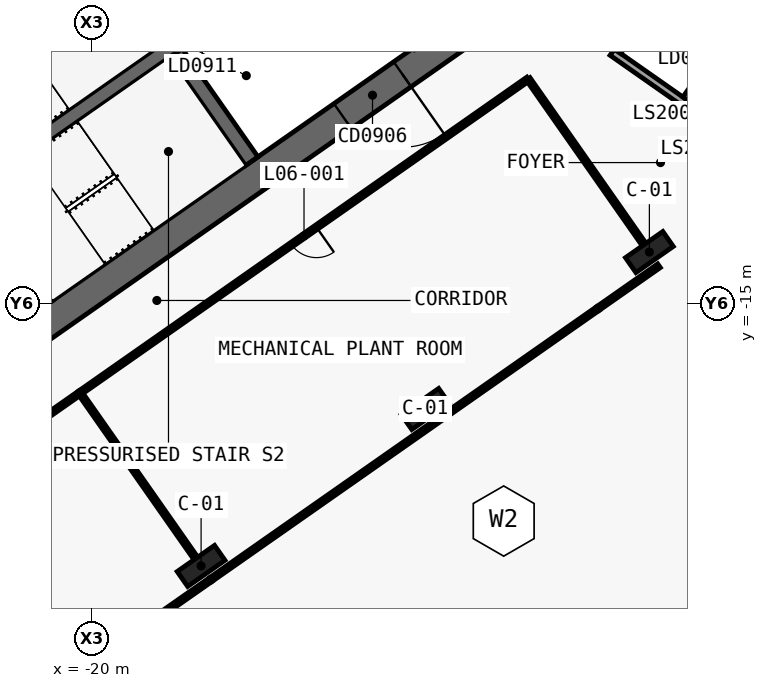
"""IFC4 building model, lengths in metres.
Left out: names, types, materials, properties, quantities, classifications, styles, units other than length and angle.
Written with IfcOpenShell. Run it as: python <this file> out.ifc"""

import sys

from ifc_helpers import new_model, si_unit, direction, frame, frame_2d, origin, origin_2d, place, context, subcontext, project, spatial, polyline, rectangle, outline, extrude, element, fill, save


model = new_model("IFC4")
c1 = context("Model", 3, precision=1e-05, world=origin(), true_north=direction((0.0, 1.0)))
c2 = subcontext(c1, "Body", "Model", "MODEL_VIEW")
j1 = project(units=[si_unit("LENGTHUNIT", "METRE"), si_unit("PLANEANGLEUNIT", "RADIAN")], contexts=[c1])
p1 = place(None, origin())
s1 = spatial("IfcSite", under=j1, at=p1, CompositionType="ELEMENT")
p2 = place(p1, origin())
s2 = spatial("IfcBuilding", under=s1, at=p2, CompositionType="ELEMENT")
p3 = place(p2, frame((0.0, 0.0, 43.0)))
s3 = spatial("IfcBuildingStorey", under=s2, at=p3, CompositionType="ELEMENT", Elevation=43.0)
p4 = place(p3, frame((0.037, 11.867, 0.0), z_axis=(0.0, 0.0, 1.0), x_axis=(-0.819155306259, -0.573571777746, 0.0)))
e1 = element("IfcWall", 1, at=p4, inside=s3, PredefinedType="SHEAR", context=c2, shape_type="SweptSolid", body=[
    extrude(outline(polyline([(33.837, 0.5), (0.7, 0.5), (0.0, -0.5), (33.837, -0.5), (33.837, 0.5)])), origin(), (0.0, 0.0, 1.0), 5.5),
])
p5 = place(p3, frame((0.037, -0.585, 0.0), z_axis=(0.0, 0.0, 1.0), x_axis=(-0.819157152511, -0.573569140985, 0.0)))
e2 = element("IfcWall", 2, at=p5, inside=s3, PredefinedType="SHEAR", context=c2, shape_type="SweptSolid", body=[
    extrude(outline(polyline([(26.695, 0.5), (0.7, 0.5), (0.0, -0.5), (26.695, -0.5), (26.695, 0.5)])), origin(), (0.0, 0.0, 1.0), 5.5),
])
p6 = place(p5, frame((2.995, 0.0, 0.0)))
e3 = element("IfcOpeningElement", 3, at=p6, cuts=e2, PredefinedType="OPENING", context=c2, shape_type="SweptSolid", body=[
    extrude(rectangle(XDim=2.4, YDim=2.1, at=frame_2d((1.2, 1.05))), frame((0.0, 0.51, 0.0), z_axis=(0.0, -1.0, 0.0), x_axis=(1.0, 0.0, 0.0)), (0.0, 0.0, 1.0), 1.02),
])
p7 = place(p5, frame((11.995, 0.0, 0.0)))
e4 = element("IfcOpeningElement", 4, at=p7, cuts=e2, PredefinedType="OPENING", context=c2, shape_type="SweptSolid", body=[
    extrude(rectangle(XDim=2.4, YDim=2.1, at=frame_2d((1.2, 1.05))), frame((0.0, 0.51, 0.0), z_axis=(0.0, -1.0, 0.0), x_axis=(1.0, 0.0, 0.0)), (0.0, 0.0, 1.0), 1.02),
])
p8 = place(p3, frame((-14.745, -10.324, 0.0), z_axis=(0.0, 0.0, 1.0), x_axis=(-0.57356780395, 0.819158088694, 0.0)))
e5 = element("IfcWall", 5, at=p8, inside=s3, PredefinedType="SHEAR", context=c2, shape_type="SweptSolid", body=[
    extrude(outline(polyline([(4.35, 0.25), (0.0, 0.25), (0.0, -0.25), (4.35, -0.25), (4.35, 0.25)])), origin(), (0.0, 0.0, 1.0), 5.5),
])
p9 = place(p3, frame((-2.638, 3.768, 0.0), z_axis=(0.0, 0.0, 1.0), x_axis=(-0.819148977158, -0.573580816643, 0.0)))
e6 = element("IfcWall", 6, at=p9, inside=s3, PredefinedType="SHEAR", context=c2, shape_type="SweptSolid", body=[
    extrude(outline(polyline([(26.0, 0.25), (0.0, 0.25), (0.0, -0.25), (26.0, -0.25), (26.0, 0.25)])), origin(), (0.0, 0.0, 1.0), 5.5),
])
p10 = place(p9, frame((1.169, 0.0, 0.0)))
e7 = element("IfcOpeningElement", 7, at=p10, cuts=e6, PredefinedType="OPENING", context=c2, shape_type="SweptSolid", body=[
    extrude(rectangle(XDim=1.1, YDim=2.1, at=frame_2d((0.55, 1.05))), frame((0.0, 0.26, 0.0), z_axis=(0.0, -1.0, 0.0), x_axis=(1.0, 0.0, 0.0)), (0.0, 0.0, 1.0), 0.52),
])
p11 = place(p9, frame((3.206, 0.0, 0.0)))
e8 = element("IfcOpeningElement", 8, at=p11, cuts=e6, PredefinedType="OPENING", context=c2, shape_type="SweptSolid", body=[
    extrude(rectangle(XDim=1.1, YDim=2.1, at=frame_2d((0.55, 1.05))), frame((0.0, 0.26, 0.0), z_axis=(0.0, -1.0, 0.0), x_axis=(1.0, 0.0, 0.0)), (0.0, 0.0, 1.0), 0.52),
])
p12 = place(p9, frame((5.244, 0.0, 0.0)))
e9 = element("IfcOpeningElement", 9, at=p12, cuts=e6, PredefinedType="OPENING", context=c2, shape_type="SweptSolid", body=[
    extrude(rectangle(XDim=1.1, YDim=2.1, at=frame_2d((0.55, 1.05))), frame((0.0, 0.26, 0.0), z_axis=(0.0, -1.0, 0.0), x_axis=(1.0, 0.0, 0.0)), (0.0, 0.0, 1.0), 0.52),
])
p13 = place(p9, frame((7.281, 0.0, 0.0)))
e10 = element("IfcOpeningElement", 10, at=p13, cuts=e6, PredefinedType="OPENING", context=c2, shape_type="SweptSolid", body=[
    extrude(rectangle(XDim=1.1, YDim=2.1, at=frame_2d((0.55, 1.05))), frame((0.0, 0.26, 0.0), z_axis=(0.0, -1.0, 0.0), x_axis=(1.0, 0.0, 0.0)), (0.0, 0.0, 1.0), 0.52),
])
p14 = place(p9, frame((9.688, 0.0, 0.0)))
e11 = element("IfcOpeningElement", 11, at=p14, cuts=e6, PredefinedType="OPENING", context=c2, shape_type="SweptSolid", body=[
    extrude(rectangle(XDim=1.1, YDim=2.1, at=frame_2d((0.55, 1.05))), frame((0.0, 0.26, 0.0), z_axis=(0.0, -1.0, 0.0), x_axis=(1.0, 0.0, 0.0)), (0.0, 0.0, 1.0), 0.52),
])
p15 = place(p9, frame((11.863, 0.0, 0.0)))
e12 = element("IfcOpeningElement", 12, at=p15, cuts=e6, PredefinedType="OPENING", context=c2, shape_type="SweptSolid", body=[
    extrude(rectangle(XDim=1.1, YDim=2.1, at=frame_2d((0.55, 1.05))), frame((0.0, 0.26, 0.0), z_axis=(0.0, -1.0, 0.0), x_axis=(1.0, 0.0, 0.0)), (0.0, 0.0, 1.0), 0.52),
])
p16 = place(p9, frame((14.038, 0.0, 0.0)))
e13 = element("IfcOpeningElement", 13, at=p16, cuts=e6, PredefinedType="OPENING", context=c2, shape_type="SweptSolid", body=[
    extrude(rectangle(XDim=1.1, YDim=2.1, at=frame_2d((0.55, 1.05))), frame((0.0, 0.26, 0.0), z_axis=(0.0, -1.0, 0.0), x_axis=(1.0, 0.0, 0.0)), (0.0, 0.0, 1.0), 0.52),
])
p17 = place(p9, frame((16.212, 0.0, 0.0)))
e14 = element("IfcOpeningElement", 14, at=p17, cuts=e6, PredefinedType="OPENING", context=c2, shape_type="SweptSolid", body=[
    extrude(rectangle(XDim=1.1, YDim=2.1, at=frame_2d((0.55, 1.05))), frame((0.0, 0.26, 0.0), z_axis=(0.0, -1.0, 0.0), x_axis=(1.0, 0.0, 0.0)), (0.0, 0.0, 1.0), 0.52),
])
for number, where, z_axis, x_axis in (
    (15, (-1.665, -13.313, 0.0), (0.0, 0.0, 1.0), (-0.819, -0.574, 0.0)),
    (16, (-9.038, -18.475, 0.0), (0.0, 0.0, 1.0), (-0.819, -0.574, 0.0)),
    (17, (-16.41, -23.637, 0.0), (0.0, 0.0, 1.0), (-0.819, -0.574, 0.0)),
):
    element("IfcColumn", number, at=place(p3, frame(where, z_axis=z_axis, x_axis=x_axis)), inside=s3, PredefinedType="COLUMN", context=c2, shape_type="SweptSolid", body=[
        extrude(rectangle(XDim=1.5, YDim=0.6, at=origin_2d()), origin(), (0.0, 0.0, 1.0), 5.5),
    ])
p18 = place(p3, frame((-2.887, -6.738, 0.0), z_axis=(0.0, 0.0, 1.0), x_axis=(0.819150280716, -0.573578954985, 0.0)))
e18 = element("IfcWall", 18, at=p18, inside=s3, PredefinedType="SOLIDWALL", context=c2, shape_type="SweptSolid", body=[
    extrude(rectangle(XDim=11.1, YDim=0.25, at=frame_2d((5.55, 0.0))), origin(), (0.0, 0.0, 1.0), 5.22),
])
p19 = place(p3, frame((-1.481, -4.731, 0.0), z_axis=(0.0, 0.0, 1.0), x_axis=(0.819150280716, -0.573578954985, 0.0)))
e19 = element("IfcWall", 19, at=p19, inside=s3, PredefinedType="SOLIDWALL", context=c2, shape_type="SweptSolid", body=[
    extrude(rectangle(XDim=11.1, YDim=0.25, at=frame_2d((5.55, 0.0))), origin(), (0.0, 0.0, 1.0), 5.22),
])
p20 = place(p19, frame((0.8, 0.0, 0.0)))
e20 = element("IfcOpeningElement", 20, at=p20, cuts=e19, PredefinedType="OPENING", context=c2, shape_type="SweptSolid", body=[
    extrude(rectangle(XDim=1.4, YDim=2.1, at=frame_2d((0.7, 1.05))), frame((0.0, 0.135, 0.0), z_axis=(0.0, -1.0, 0.0), x_axis=(1.0, 0.0, 0.0)), (0.0, 0.0, 1.0), 0.27),
])
p21 = place(p19, frame((3.5, 0.0, 0.0)))
e21 = element("IfcOpeningElement", 21, at=p21, cuts=e19, PredefinedType="OPENING", context=c2, shape_type="SweptSolid", body=[
    extrude(rectangle(XDim=1.4, YDim=2.1, at=frame_2d((0.7, 1.05))), frame((0.0, 0.135, 0.0), z_axis=(0.0, -1.0, 0.0), x_axis=(1.0, 0.0, 0.0)), (0.0, 0.0, 1.0), 0.27),
])
p22 = place(p19, frame((6.2, 0.0, 0.0)))
e22 = element("IfcOpeningElement", 22, at=p22, cuts=e19, PredefinedType="OPENING", context=c2, shape_type="SweptSolid", body=[
    extrude(rectangle(XDim=1.4, YDim=2.1, at=frame_2d((0.7, 1.05))), frame((0.0, 0.135, 0.0), z_axis=(0.0, -1.0, 0.0), x_axis=(1.0, 0.0, 0.0)), (0.0, 0.0, 1.0), 0.27),
])
p23 = place(p19, frame((8.9, 0.0, 0.0)))
e23 = element("IfcOpeningElement", 23, at=p23, cuts=e19, PredefinedType="OPENING", context=c2, shape_type="SweptSolid", body=[
    extrude(rectangle(XDim=1.4, YDim=2.1, at=frame_2d((0.7, 1.05))), frame((0.0, 0.135, 0.0), z_axis=(0.0, -1.0, 0.0), x_axis=(1.0, 0.0, 0.0)), (0.0, 0.0, 1.0), 0.27),
])
p24 = place(p3, frame((-2.713, -6.707, 0.0), z_axis=(0.0, 0.0, 1.0), x_axis=(0.573581496053, 0.819148501424, 0.0)))
e24 = element("IfcWall", 24, at=p24, inside=s3, PredefinedType="SOLIDWALL", context=c2, shape_type="SweptSolid", body=[
    extrude(rectangle(XDim=2.2, YDim=0.25, at=frame_2d((1.1, 0.0))), origin(), (0.0, 0.0, 1.0), 5.22),
])
p25 = place(p3, frame((-0.48, -8.27, 0.0), z_axis=(0.0, 0.0, 1.0), x_axis=(0.573633636671, 0.819111989218, 0.0)))
e25 = element("IfcWall", 25, at=p25, inside=s3, PredefinedType="SOLIDWALL", context=c2, shape_type="SweptSolid", body=[
    extrude(rectangle(XDim=2.2, YDim=0.2, at=frame_2d((1.1, 0.0))), origin(), (0.0, 0.0, 1.0), 5.22),
])
p26 = place(p3, frame((-5.652, -7.62, 0.0), z_axis=(0.0, 0.0, 1.0), x_axis=(-0.819147172988, -0.573583393228, 0.0)))
e26 = element("IfcWall", 26, at=p26, inside=s3, PredefinedType="PARTITIONING", context=c2, shape_type="SweptSolid", body=[
    extrude(rectangle(XDim=18.002, YDim=0.15, at=frame_2d((9.001, 0.0))), origin(), (0.0, 0.0, 1.0), 4.5),
])
p27 = place(p26, frame((8.501, 0.0, 0.0)))
e27 = element("IfcOpeningElement", 27, at=p27, cuts=e26, PredefinedType="OPENING", context=c2, shape_type="SweptSolid", body=[
    extrude(rectangle(XDim=1.0, YDim=2.1, at=frame_2d((0.5, 1.05))), frame((0.0, 0.085, 0.0), z_axis=(0.0, -1.0, 0.0), x_axis=(1.0, 0.0, 0.0)), (0.0, 0.0, 1.0), 0.17),
])
p28 = place(p3, frame((-20.395, -17.943, 0.0), z_axis=(0.0, 0.0, 1.0), x_axis=(-0.819154909514, -0.573572344364, 0.0)))
e28 = element("IfcWall", 28, at=p28, inside=s3, PredefinedType="PARTITIONING", context=c2, shape_type="SweptSolid", body=[
    extrude(rectangle(XDim=21.002, YDim=0.15, at=frame_2d((10.501, 0.0))), origin(), (0.0, 0.0, 1.0), 4.4),
])
p29 = place(p28, frame((10.051, 0.0, 0.0)))
e29 = element("IfcOpeningElement", 29, at=p29, cuts=e28, PredefinedType="OPENING", context=c2, shape_type="SweptSolid", body=[
    extrude(rectangle(XDim=0.9, YDim=2.1, at=frame_2d((0.45, 1.05))), frame((0.0, 0.085, 0.0), z_axis=(0.0, -1.0, 0.0), x_axis=(1.0, 0.0, 0.0)), (0.0, 0.0, 1.0), 0.17),
])
p30 = place(p3, frame((-16.095, -24.09, 0.0), z_axis=(0.0, 0.0, 1.0), x_axis=(0.819143409619, 0.57358876774, 0.0)))
e30 = element("IfcWall", 30, at=p30, inside=s3, PredefinedType="PARTITIONING", context=c2, shape_type="SweptSolid", body=[
    extrude(rectangle(XDim=15.552, YDim=0.15, at=frame_2d((7.776, 0.0))), origin(), (0.0, 0.0, 1.0), 4.08),
])
p31 = place(p3, frame((-30.839, -34.413, 0.0), z_axis=(0.0, 0.0, 1.0), x_axis=(0.819149083218, 0.573580665175, 0.0)))
e31 = element("IfcWall", 31, at=p31, inside=s3, PredefinedType="PARTITIONING", context=c2, shape_type="SweptSolid", body=[
    extrude(rectangle(XDim=18.002, YDim=0.15, at=frame_2d((9.001, 0.0))), origin(), (0.0, 0.0, 1.0), 5.1),
])
p32 = place(p3, frame((-3.355, -15.169, 0.0), z_axis=(0.0, 0.0, 1.0), x_axis=(0.819157023945, 0.573569324599, 0.0)))
e32 = element("IfcWall", 32, at=p32, inside=s3, PredefinedType="PARTITIONING", context=c2, shape_type="SweptSolid", body=[
    extrude(rectangle(XDim=2.45, YDim=0.15, at=frame_2d((1.225, 0.0))), origin(), (0.0, 0.0, 1.0), 5.1),
])
p33 = place(p3, frame((-1.849, -13.051, 0.0), z_axis=(0.0, 0.0, 1.0), x_axis=(-0.573575988258, 0.819152358047, 0.0)))
e33 = element("IfcWall", 33, at=p33, inside=s3, PredefinedType="PARTITIONING", context=c2, shape_type="SweptSolid", body=[
    extrude(rectangle(XDim=6.632, YDim=0.15, at=frame_2d((3.316, 0.0))), origin(), (0.0, 0.0, 1.0), 4.5),
])
p34 = place(p3, frame((-16.594, -23.375, 0.0), z_axis=(0.0, 0.0, 1.0), x_axis=(-0.57359826181, 0.819136761505, 0.0)))
e34 = element("IfcWall", 34, at=p34, inside=s3, PredefinedType="PARTITIONING", context=c2, shape_type="SweptSolid", body=[
    extrude(rectangle(XDim=6.63, YDim=0.15, at=frame_2d((3.315, 0.0))), origin(), (0.0, 0.0, 1.0), 4.5),
])
p35 = place(p7, origin())
e35 = element("IfcDoor", 35, at=p35, inside=s3, OperationType="DOUBLE_DOOR_SINGLE_SWING", PredefinedType="DOOR", context=c2, shape_type="SweptSolid", body=[
    extrude(rectangle(XDim=2.4, YDim=2.1, at=frame_2d((1.2, 1.05))), frame((0.0, 0.025, 0.0), z_axis=(0.0, -1.0, 0.0), x_axis=(1.0, 0.0, 0.0)), (0.0, 0.0, 1.0), 0.05),
])
fill(e4, e35)
p36 = place(p27, origin())
e36 = element("IfcDoor", 36, at=p36, inside=s3, OperationType="SINGLE_SWING_LEFT", PredefinedType="DOOR", context=c2, shape_type="SweptSolid", body=[
    extrude(rectangle(XDim=1.0, YDim=2.1, at=frame_2d((0.5, 1.05))), frame((0.0, 0.025, 0.0), z_axis=(0.0, -1.0, 0.0), x_axis=(1.0, 0.0, 0.0)), (0.0, 0.0, 1.0), 0.05),
])
fill(e27, e36)
save(model, sys.argv[1])
